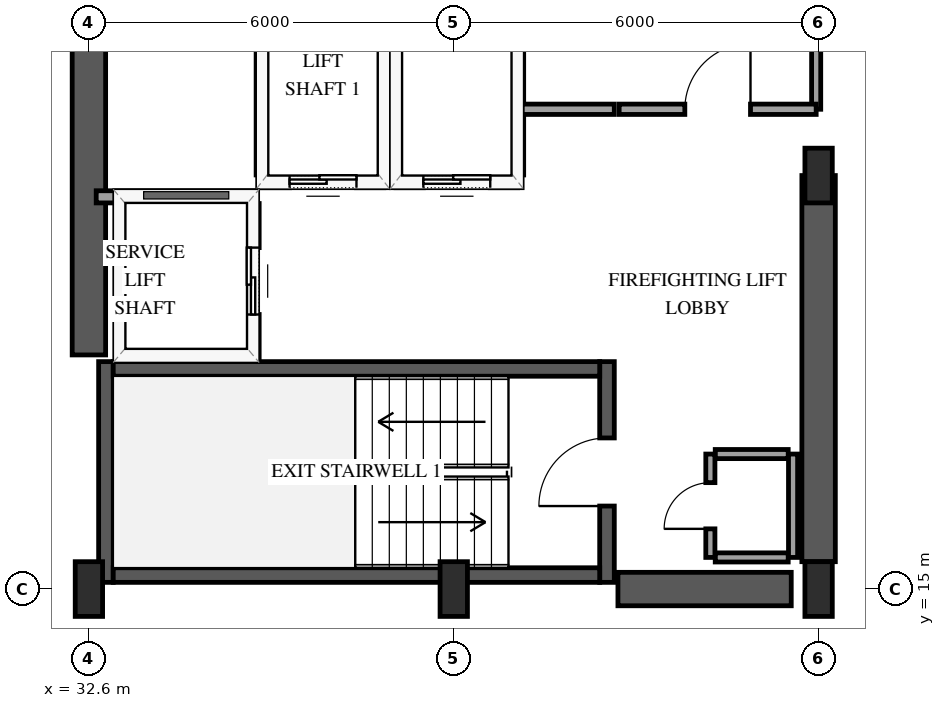
"""IFC4 building model, lengths in metres.
Left out: names, types, materials, properties, quantities, classifications, styles, units other than length and angle.
Written with IfcOpenShell. Run it as: python <this file> out.ifc"""

import sys

from ifc_helpers import new_model, si_unit, direction, frame, frame_2d, origin, origin_2d, place, context, subcontext, project, spatial, rectangle, extrude, element, fill, save


model = new_model("IFC4")
c1 = context("Model", 3, precision=1e-05, world=origin(), true_north=direction((0.0, 1.0)))
c2 = subcontext(c1, "Body", "Model", "MODEL_VIEW")
j1 = project(units=[si_unit("LENGTHUNIT", "METRE"), si_unit("PLANEANGLEUNIT", "RADIAN")], contexts=[c1])
p1 = place(None, origin())
s1 = spatial("IfcSite", under=j1, at=p1, CompositionType="ELEMENT")
p2 = place(p1, origin())
s2 = spatial("IfcBuilding", under=s1, at=p2, CompositionType="ELEMENT")
p3 = place(p2, frame((0.0, 0.0, 182.2)))
s3 = spatial("IfcBuildingStorey", under=s2, at=p3, CompositionType="ELEMENT", Elevation=182.2)
p4 = place(p3, frame((32.88, 15.11, 0.0), z_axis=(0.0, 0.0, 1.0), x_axis=(0.0, 1.0, 0.0)))
e1 = element("IfcWall", 1, at=p4, inside=s3, PredefinedType="SHEAR", context=c2, shape_type="SweptSolid", body=[
    extrude(rectangle(XDim=3.63, YDim=0.24, at=frame_2d((1.815, 0.0))), origin(), (0.0, 0.0, 1.0), 3.6),
])
p5 = place(p3, frame((41.12, 15.11, 0.0), z_axis=(0.0, 0.0, 1.0), x_axis=(0.0, 1.0, 0.0)))
e2 = element("IfcWall", 2, at=p5, inside=s3, PredefinedType="SHEAR", context=c2, shape_type="SweptSolid", body=[
    extrude(rectangle(XDim=3.63, YDim=0.24, at=frame_2d((1.815, 0.0))), origin(), (0.0, 0.0, 1.0), 3.6),
])
p6 = place(p5, frame((1.255, 0.0, 0.0)))
e3 = element("IfcOpeningElement", 3, at=p6, cuts=e2, PredefinedType="OPENING", context=c2, shape_type="SweptSolid", body=[
    extrude(rectangle(XDim=1.12, YDim=2.15, at=frame_2d((0.56, 1.075))), frame((0.0, 0.13, 0.0), z_axis=(0.0, -1.0, 0.0), x_axis=(1.0, 0.0, 0.0)), (0.0, 0.0, 1.0), 0.26),
])
for number, where, z_axis, x_axis in (
    (4, (33.0, 15.23, 0.0), (0.0, 0.0, 1.0), (1.0, 0.0, 0.0)),
    (5, (33.0, 18.62, 0.0), (0.0, 0.0, 1.0), (1.0, 0.0, 0.0)),
):
    element("IfcWall", number, at=place(p3, frame(where, z_axis=z_axis, x_axis=x_axis)), inside=s3, PredefinedType="SHEAR", context=c2, shape_type="SweptSolid", body=[
        extrude(rectangle(XDim=8.0, YDim=0.24, at=frame_2d((4.0, 0.0))), origin(), (0.0, 0.0, 1.0), 3.6),
    ])
p7 = place(p3, frame((32.6, 18.85, 0.0), z_axis=(0.0, 0.0, 1.0), x_axis=(0.0, 1.0, 0.0)))
e6 = element("IfcWall", 6, at=p7, inside=s3, PredefinedType="SHEAR", context=c2, shape_type="SweptSolid", body=[
    extrude(rectangle(XDim=12.3, YDim=0.55, at=frame_2d((6.15, 0.0))), origin(), (0.0, 0.0, 1.0), 3.6),
])
p8 = place(p3, frame((41.3, 15.0, 0.0), z_axis=(0.0, 0.0, 1.0), x_axis=(1.0, 0.0, 0.0)))
e7 = element("IfcWall", 7, at=p8, inside=s3, PredefinedType="SHEAR", context=c2, shape_type="SweptSolid", body=[
    extrude(rectangle(XDim=2.85, YDim=0.55, at=frame_2d((1.425, 0.0))), origin(), (0.0, 0.0, 1.0), 3.6),
])
p9 = place(p3, frame((44.6, 15.45, 0.0), z_axis=(0.0, 0.0, 1.0), x_axis=(0.0, 1.0, 0.0)))
e8 = element("IfcWall", 8, at=p9, inside=s3, PredefinedType="SHEAR", context=c2, shape_type="SweptSolid", body=[
    extrude(rectangle(XDim=6.35, YDim=0.55, at=frame_2d((3.175, 0.0))), origin(), (0.0, 0.0, 1.0), 3.6),
])
for number, where, z_axis, x_axis in (
    (9, (32.6, 15.0, 0.0), (0.0, 0.0, 1.0), (1.0, 0.0, 0.0)),
    (10, (38.6, 15.0, 0.0), (0.0, 0.0, 1.0), (1.0, 0.0, 0.0)),
    (11, (44.6, 15.0, 0.0), (0.0, 0.0, 1.0), (1.0, 0.0, 0.0)),
    (12, (44.6, 21.8, 0.0), (0.0, 0.0, 1.0), (1.0, 0.0, 0.0)),
):
    element("IfcColumn", number, at=place(p3, frame(where, z_axis=z_axis, x_axis=x_axis)), inside=s3, PredefinedType="PILASTER", context=c2, shape_type="SweptSolid", body=[
        extrude(rectangle(XDim=0.45, YDim=0.9, at=origin_2d()), origin(), (0.0, 0.0, 1.0), 3.6),
    ])
p10 = place(p3, frame((35.45, 21.7, 0.0), z_axis=(0.0, 0.0, 1.0), x_axis=(1.0, 0.0, 0.0)))
e13 = element("IfcWall", 13, at=p10, inside=s3, PredefinedType="SOLIDWALL", context=c2, shape_type="SweptSolid", body=[
    extrude(rectangle(XDim=2.0, YDim=0.2, at=frame_2d((1.0, 0.0))), origin(), (0.0, 0.0, 1.0), 3.26),
])
p11 = place(p10, frame((0.45, 0.0, 0.0)))
e14 = element("IfcOpeningElement", 14, at=p11, cuts=e13, PredefinedType="OPENING", context=c2, shape_type="SweptSolid", body=[
    extrude(rectangle(XDim=1.1, YDim=2.15, at=frame_2d((0.55, 1.075))), frame((0.0, 0.11, 0.0), z_axis=(0.0, -1.0, 0.0), x_axis=(1.0, 0.0, 0.0)), (0.0, 0.0, 1.0), 0.22),
])
for number, where, z_axis, x_axis in (
    (15, (35.45, 21.81, 0.0), (0.0, 0.0, 1.0), (0.0, 1.0, 0.0)),
    (16, (37.45, 21.81, 0.0), (0.0, 0.0, 1.0), (0.0, 1.0, 0.0)),
):
    element("IfcWall", number, at=place(p3, frame(where, z_axis=z_axis, x_axis=x_axis)), inside=s3, PredefinedType="SOLIDWALL", context=c2, shape_type="SweptSolid", body=[
        extrude(rectangle(XDim=2.38, YDim=0.2, at=frame_2d((1.19, 0.0))), origin(), (0.0, 0.0, 1.0), 3.26),
    ])
p12 = place(p3, frame((37.65, 21.7, 0.0), z_axis=(0.0, 0.0, 1.0), x_axis=(1.0, 0.0, 0.0)))
e17 = element("IfcWall", 17, at=p12, inside=s3, PredefinedType="SOLIDWALL", context=c2, shape_type="SweptSolid", body=[
    extrude(rectangle(XDim=2.0, YDim=0.2, at=frame_2d((1.0, 0.0))), origin(), (0.0, 0.0, 1.0), 3.26),
])
p13 = place(p12, frame((0.45, 0.0, 0.0)))
e18 = element("IfcOpeningElement", 18, at=p13, cuts=e17, PredefinedType="OPENING", context=c2, shape_type="SweptSolid", body=[
    extrude(rectangle(XDim=1.1, YDim=2.15, at=frame_2d((0.55, 1.075))), frame((0.0, 0.11, 0.0), z_axis=(0.0, -1.0, 0.0), x_axis=(1.0, 0.0, 0.0)), (0.0, 0.0, 1.0), 0.22),
])
p14 = place(p3, frame((39.65, 21.81, 0.0), z_axis=(0.0, 0.0, 1.0), x_axis=(0.0, 1.0, 0.0)))
e19 = element("IfcWall", 19, at=p14, inside=s3, PredefinedType="SOLIDWALL", context=c2, shape_type="SweptSolid", body=[
    extrude(rectangle(XDim=2.38, YDim=0.2, at=frame_2d((1.19, 0.0))), origin(), (0.0, 0.0, 1.0), 3.26),
])
p15 = place(p3, frame((32.72, 21.45, 0.0), z_axis=(0.0, 0.0, 1.0), x_axis=(1.0, 0.0, 0.0)))
e20 = element("IfcWall", 20, at=p15, inside=s3, PredefinedType="SOLIDWALL", context=c2, shape_type="SweptSolid", body=[
    extrude(rectangle(XDim=2.58, YDim=0.2, at=frame_2d((1.29, 0.0))), origin(), (0.0, 0.0, 1.0), 3.26),
])
p16 = place(p3, frame((35.3, 18.79, 0.0), z_axis=(0.0, 0.0, 1.0), x_axis=(0.0, 1.0, 0.0)))
e21 = element("IfcWall", 21, at=p16, inside=s3, PredefinedType="SOLIDWALL", context=c2, shape_type="SweptSolid", body=[
    extrude(rectangle(XDim=2.55, YDim=0.2, at=frame_2d((1.275, 0.0))), origin(), (0.0, 0.0, 1.0), 3.26),
])
p17 = place(p16, frame((0.725, 0.0, 0.0)))
e22 = element("IfcOpeningElement", 22, at=p17, cuts=e21, PredefinedType="OPENING", context=c2, shape_type="SweptSolid", body=[
    extrude(rectangle(XDim=1.1, YDim=2.15, at=frame_2d((0.55, 1.075))), frame((0.0, 0.11, 0.0), z_axis=(0.0, -1.0, 0.0), x_axis=(1.0, 0.0, 0.0)), (0.0, 0.0, 1.0), 0.22),
])
for number, where, z_axis, x_axis in (
    (23, (42.9, 15.52, 0.0), (0.0, 0.0, 1.0), (1.0, 0.0, 0.0)),
    (24, (42.9, 17.22, 0.0), (0.0, 0.0, 1.0), (1.0, 0.0, 0.0)),
):
    element("IfcWall", number, at=place(p3, frame(where, z_axis=z_axis, x_axis=x_axis)), inside=s3, PredefinedType="PARTITIONING", context=c2, shape_type="SweptSolid", body=[
        extrude(rectangle(XDim=1.2, YDim=0.15, at=frame_2d((0.6, 0.0))), origin(), (0.0, 0.0, 1.0), 3.26),
    ])
p18 = place(p3, frame((44.18, 15.52, 0.0), z_axis=(0.0, 0.0, 1.0), x_axis=(0.0, 1.0, 0.0)))
e25 = element("IfcWall", 25, at=p18, inside=s3, PredefinedType="PARTITIONING", context=c2, shape_type="SweptSolid", body=[
    extrude(rectangle(XDim=1.7, YDim=0.15, at=frame_2d((0.85, 0.0))), origin(), (0.0, 0.0, 1.0), 3.26),
])
p19 = place(p3, frame((42.82, 15.52, 0.0), z_axis=(0.0, 0.0, 1.0), x_axis=(0.0, 1.0, 0.0)))
e26 = element("IfcWall", 26, at=p19, inside=s3, PredefinedType="PARTITIONING", context=c2, shape_type="SweptSolid", body=[
    extrude(rectangle(XDim=1.7, YDim=0.15, at=frame_2d((0.85, 0.0))), origin(), (0.0, 0.0, 1.0), 3.26),
])
p20 = place(p19, frame((0.47, 0.0, 0.0)))
e27 = element("IfcOpeningElement", 27, at=p20, cuts=e26, PredefinedType="OPENING", context=c2, shape_type="SweptSolid", body=[
    extrude(rectangle(XDim=0.76, YDim=2.0, at=frame_2d((0.38, 1.0))), frame((0.0, 0.085, 0.0), z_axis=(0.0, -1.0, 0.0), x_axis=(1.0, 0.0, 0.0)), (0.0, 0.0, 1.0), 0.17),
])
p21 = place(p3, frame((44.56, 29.8, 0.0), z_axis=(0.0, 0.0, 1.0), x_axis=(0.0, -1.0, 0.0)))
e28 = element("IfcWall", 28, at=p21, inside=s3, PredefinedType="PARTITIONING", context=c2, shape_type="SweptSolid", body=[
    extrude(rectangle(XDim=6.91, YDim=0.15, at=frame_2d((3.455, 0.0))), origin(), (0.0, 0.0, 1.0), 2.3),
])
p22 = place(p21, frame((2.915, 0.0, 0.0)))
e29 = element("IfcOpeningElement", 29, at=p22, cuts=e28, PredefinedType="OPENING", context=c2, shape_type="SweptSolid", body=[
    extrude(rectangle(XDim=1.08, YDim=2.15, at=frame_2d((0.54, 1.075))), frame((0.0, 0.085, 0.0), z_axis=(0.0, -1.0, 0.0), x_axis=(1.0, 0.0, 0.0)), (0.0, 0.0, 1.0), 0.17),
])
p23 = place(p3, frame((41.32, 22.89, 0.0), z_axis=(0.0, 0.0, 1.0), x_axis=(1.0, 0.0, 0.0)))
e30 = element("IfcWall", 30, at=p23, inside=s3, PredefinedType="PARTITIONING", context=c2, shape_type="SweptSolid", body=[
    extrude(rectangle(XDim=3.24, YDim=0.17, at=frame_2d((1.62, 0.0))), origin(), (0.0, 0.0, 1.0), 3.26),
])
p24 = place(p23, frame((1.08, 0.0, 0.0)))
e31 = element("IfcOpeningElement", 31, at=p24, cuts=e30, PredefinedType="OPENING", context=c2, shape_type="SweptSolid", body=[
    extrude(rectangle(XDim=1.08, YDim=2.15, at=frame_2d((0.54, 1.075))), frame((0.0, 0.095, 0.0), z_axis=(0.0, -1.0, 0.0), x_axis=(1.0, 0.0, 0.0)), (0.0, 0.0, 1.0), 0.19),
])
p25 = place(p3, frame((39.72, 22.89, 0.0), z_axis=(0.0, 0.0, 1.0), x_axis=(1.0, 0.0, 0.0)))
e32 = element("IfcWall", 32, at=p25, inside=s3, PredefinedType="PARTITIONING", context=c2, shape_type="SweptSolid", body=[
    extrude(rectangle(XDim=1.52, YDim=0.17, at=frame_2d((0.76, 0.0))), origin(), (0.0, 0.0, 1.0), 3.26),
])
p26 = place(p11, origin())
e33 = element("IfcDoor", 33, at=p26, inside=s3, OperationType="SLIDING_TO_LEFT", PredefinedType="DOOR", context=c2, shape_type="SweptSolid", body=[
    extrude(rectangle(XDim=1.1, YDim=2.15, at=frame_2d((0.55, 1.075))), frame((0.0, 0.025, 0.0), z_axis=(0.0, -1.0, 0.0), x_axis=(1.0, 0.0, 0.0)), (0.0, 0.0, 1.0), 0.05),
])
fill(e14, e33)
p27 = place(p13, origin())
e34 = element("IfcDoor", 34, at=p27, inside=s3, OperationType="SLIDING_TO_LEFT", PredefinedType="DOOR", context=c2, shape_type="SweptSolid", body=[
    extrude(rectangle(XDim=1.1, YDim=2.15, at=frame_2d((0.55, 1.075))), frame((0.0, 0.025, 0.0), z_axis=(0.0, -1.0, 0.0), x_axis=(1.0, 0.0, 0.0)), (0.0, 0.0, 1.0), 0.05),
])
fill(e18, e34)
p28 = place(p17, origin())
e35 = element("IfcDoor", 35, at=p28, inside=s3, OperationType="SLIDING_TO_LEFT", PredefinedType="DOOR", context=c2, shape_type="SweptSolid", body=[
    extrude(rectangle(XDim=1.1, YDim=2.15, at=frame_2d((0.55, 1.075))), frame((0.0, 0.025, 0.0), z_axis=(0.0, -1.0, 0.0), x_axis=(1.0, 0.0, 0.0)), (0.0, 0.0, 1.0), 0.05),
])
fill(e22, e35)
p29 = place(p6, origin())
e36 = element("IfcDoor", 36, at=p29, inside=s3, OperationType="SINGLE_SWING_LEFT", PredefinedType="DOOR", context=c2, shape_type="SweptSolid", body=[
    extrude(rectangle(XDim=1.12, YDim=2.15, at=frame_2d((0.56, 1.075))), frame((0.0, 0.025, 0.0), z_axis=(0.0, -1.0, 0.0), x_axis=(1.0, 0.0, 0.0)), (0.0, 0.0, 1.0), 0.05),
])
fill(e3, e36)
p30 = place(p20, origin())
e37 = element("IfcDoor", 37, at=p30, inside=s3, OperationType="SINGLE_SWING_LEFT", PredefinedType="TRAPDOOR", context=c2, shape_type="SweptSolid", body=[
    extrude(rectangle(XDim=0.76, YDim=2.0, at=frame_2d((0.38, 1.0))), frame((0.0, 0.025, 0.0), z_axis=(0.0, -1.0, 0.0), x_axis=(1.0, 0.0, 0.0)), (0.0, 0.0, 1.0), 0.05),
])
fill(e27, e37)
p31 = place(p24, origin())
e38 = element("IfcDoor", 38, at=p31, inside=s3, OperationType="SINGLE_SWING_RIGHT", PredefinedType="DOOR", context=c2, shape_type="SweptSolid", body=[
    extrude(rectangle(XDim=1.08, YDim=2.15, at=frame_2d((0.54, 1.075))), frame((0.0, 0.025, 0.0), z_axis=(0.0, -1.0, 0.0), x_axis=(1.0, 0.0, 0.0)), (0.0, 0.0, 1.0), 0.05),
])
fill(e31, e38)
save(model, sys.argv[1])
